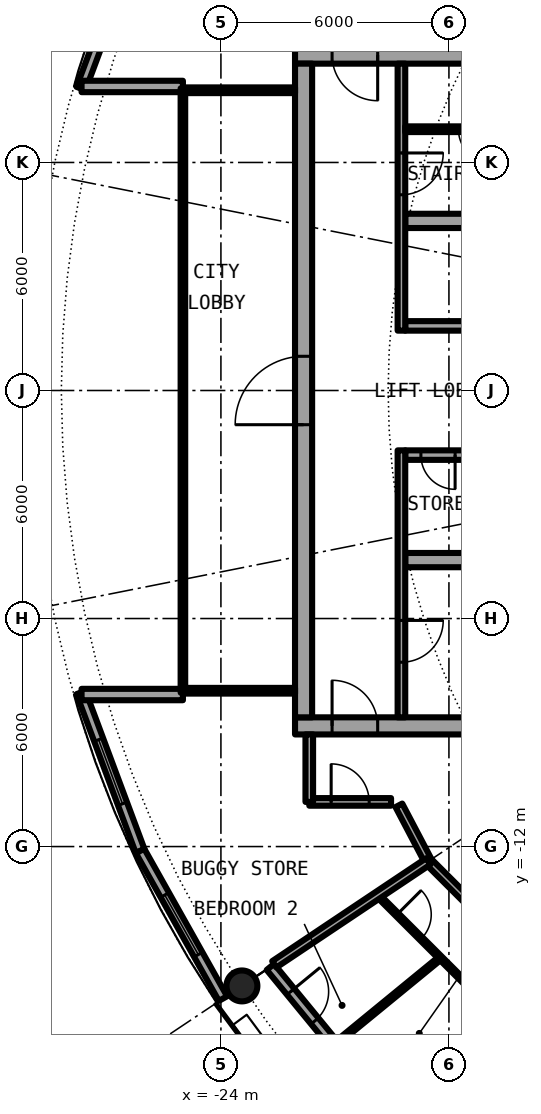
"""IFC4 building model, lengths in metres.
Left out: names, types, materials, properties, quantities, classifications, styles, units other than length and angle.
Written with IfcOpenShell. Run it as: python <this file> out.ifc"""

import sys

from ifc_helpers import new_model, si_unit, direction, frame, frame_2d, origin, origin_2d, place, context, subcontext, project, spatial, rectangle, hollow_circle, extrude, element, fill, save


model = new_model("IFC4")
c1 = context("Model", 3, precision=1e-05, world=origin(), true_north=direction((0.0, 1.0)))
c2 = subcontext(c1, "Body", "Model", "MODEL_VIEW")
j1 = project(units=[si_unit("LENGTHUNIT", "METRE"), si_unit("PLANEANGLEUNIT", "RADIAN")], contexts=[c1])
p1 = place(None, origin())
s1 = spatial("IfcSite", under=j1, at=p1, CompositionType="ELEMENT")
p2 = place(p1, origin())
s2 = spatial("IfcBuilding", under=s1, at=p2, CompositionType="ELEMENT")
p3 = place(p2, frame((0.0, 0.0, 196.3)))
s3 = spatial("IfcBuildingStorey", under=s2, at=p3, CompositionType="ELEMENT", Elevation=196.3)
p4 = place(p3, frame((-23.448, -15.667, 0.0), z_axis=(0.0, 0.0, 1.0), x_axis=(1.0, 0.0, 0.0)))
e1 = element("IfcColumn", 1, at=p4, inside=s3, PredefinedType="COLUMN", context=c2, shape_type="SweptSolid", body=[
    extrude(hollow_circle(Radius=0.406, WallThickness=0.03, at=origin_2d()), origin(), (0.0, 0.0, 1.0), 3.05),
])
p5 = place(p3, frame((-22.699, -15.167, 0.0), z_axis=(0.0, 0.0, 1.0), x_axis=(0.634382322723, -0.773019449054, 0.0)))
e2 = element("IfcWall", 2, at=p5, inside=s3, PredefinedType="SOLIDWALL", context=c2, shape_type="SweptSolid", body=[
    extrude(rectangle(XDim=5.352, YDim=0.25, at=frame_2d((2.676, 0.0))), origin(), (0.0, 0.0, 1.0), 2.7),
])
p6 = place(p5, frame((0.841, 0.0, 0.0)))
e3 = element("IfcOpeningElement", 3, at=p6, cuts=e2, PredefinedType="OPENING", context=c2, shape_type="SweptSolid", body=[
    extrude(rectangle(XDim=1.0, YDim=2.2, at=frame_2d((0.5, 1.1))), frame((0.0, 0.135, 0.0), z_axis=(0.0, -1.0, 0.0), x_axis=(1.0, 0.0, 0.0)), (0.0, 0.0, 1.0), 0.27),
])
p7 = place(p5, frame((3.111, 0.0, 0.3)))
e4 = element("IfcOpeningElement", 4, at=p7, cuts=e2, PredefinedType="OPENING", context=c2, shape_type="SweptSolid", body=[
    extrude(rectangle(XDim=1.8, YDim=2.1, at=frame_2d((0.9, 1.05))), frame((0.0, 0.135, 0.0), z_axis=(0.0, -1.0, 0.0), x_axis=(1.0, 0.0, 0.0)), (0.0, 0.0, 1.0), 0.27),
])
p8 = place(p3, frame((-27.682, -7.945, 0.0), z_axis=(0.0, 0.0, 1.0), x_axis=(0.349247811493, -0.937030397675, 0.0)))
e5 = element("IfcWall", 5, at=p8, inside=s3, PredefinedType="SOLIDWALL", context=c2, shape_type="SweptSolid", body=[
    extrude(rectangle(XDim=4.452, YDim=0.25, at=frame_2d((2.226, 0.0))), origin(), (0.0, 0.0, 1.0), 2.7),
])
p9 = place(p8, frame((1.327, 0.0, 0.3)))
e6 = element("IfcOpeningElement", 6, at=p9, cuts=e5, PredefinedType="OPENING", context=c2, shape_type="SweptSolid", body=[
    extrude(rectangle(XDim=1.8, YDim=2.1, at=frame_2d((0.9, 1.05))), frame((0.0, 0.135, 0.0), z_axis=(0.0, -1.0, 0.0), x_axis=(1.0, 0.0, 0.0)), (0.0, 0.0, 1.0), 0.27),
])
p10 = place(p3, frame((-26.127, -12.117, 0.0), z_axis=(0.0, 0.0, 1.0), x_axis=(0.489696356642, -0.871893042919, 0.0)))
e7 = element("IfcWall", 7, at=p10, inside=s3, PredefinedType="SOLIDWALL", context=c2, shape_type="SweptSolid", body=[
    extrude(rectangle(XDim=4.454, YDim=0.25, at=frame_2d((2.227, 0.0))), origin(), (0.0, 0.0, 1.0), 2.7),
])
p11 = place(p10, frame((1.327, 0.0, 0.3)))
e8 = element("IfcOpeningElement", 8, at=p11, cuts=e7, PredefinedType="OPENING", context=c2, shape_type="SweptSolid", body=[
    extrude(rectangle(XDim=1.8, YDim=2.1, at=frame_2d((0.9, 1.05))), frame((0.0, 0.135, 0.0), z_axis=(0.0, -1.0, 0.0), x_axis=(1.0, 0.0, 0.0)), (0.0, 0.0, 1.0), 0.27),
])
p12 = place(p3, frame((-26.127, 12.117, 0.0), z_axis=(0.0, 0.0, 1.0), x_axis=(-0.349247811493, -0.937030397675, 0.0)))
e9 = element("IfcWall", 9, at=p12, inside=s3, PredefinedType="SOLIDWALL", context=c2, shape_type="SweptSolid", body=[
    extrude(rectangle(XDim=4.452, YDim=0.25, at=frame_2d((2.226, 0.0))), origin(), (0.0, 0.0, 1.0), 2.7),
])
p13 = place(p12, frame((1.327, 0.0, 0.3)))
e10 = element("IfcOpeningElement", 10, at=p13, cuts=e9, PredefinedType="OPENING", context=c2, shape_type="SweptSolid", body=[
    extrude(rectangle(XDim=1.8, YDim=2.1, at=frame_2d((0.9, 1.05))), frame((0.0, 0.135, 0.0), z_axis=(0.0, -1.0, 0.0), x_axis=(1.0, 0.0, 0.0)), (0.0, 0.0, 1.0), 0.27),
])
for number, where, z_axis, x_axis in (
    (11, (-25.0, 8.0, 0.0), (0.0, 0.0, 1.0), (-1.0, 0.0, 0.0)),
    (12, (-25.0, -8.0, 0.0), (0.0, 0.0, 1.0), (-1.0, 0.0, 0.0)),
):
    element("IfcWall", number, at=place(p3, frame(where, z_axis=z_axis, x_axis=x_axis)), inside=s3, PredefinedType="SOLIDWALL", context=c2, shape_type="SweptSolid", body=[
        extrude(rectangle(XDim=2.667, YDim=0.3, at=frame_2d((1.333, 0.0))), origin(), (0.0, 0.0, 1.0), 2.7),
    ])
p14 = place(p3, frame((-22.05, -8.825, 0.0), z_axis=(0.0, 0.0, 1.0), x_axis=(1.0, 0.0, 0.0)))
e13 = element("IfcWall", 13, at=p14, inside=s3, PredefinedType="SHEAR", context=c2, shape_type="SweptSolid", body=[
    extrude(rectangle(XDim=13.5, YDim=0.45, at=frame_2d((6.75, 0.0))), origin(), (0.0, 0.0, 1.0), 3.05),
])
p15 = place(p14, frame((0.975, 0.0, 0.0)))
e14 = element("IfcOpeningElement", 14, at=p15, cuts=e13, PredefinedType="OPENING", context=c2, shape_type="SweptSolid", body=[
    extrude(rectangle(XDim=1.2, YDim=2.3, at=frame_2d((0.6, 1.15))), frame((0.0, 0.235, 0.0), z_axis=(0.0, -1.0, 0.0), x_axis=(1.0, 0.0, 0.0)), (0.0, 0.0, 1.0), 0.47),
])
p16 = place(p3, frame((-8.55, 8.825, 0.0), z_axis=(0.0, 0.0, 1.0), x_axis=(-1.0, 0.0, 0.0)))
e15 = element("IfcWall", 15, at=p16, inside=s3, PredefinedType="SHEAR", context=c2, shape_type="SweptSolid", body=[
    extrude(rectangle(XDim=13.5, YDim=0.45, at=frame_2d((6.75, 0.0))), origin(), (0.0, 0.0, 1.0), 3.05),
])
p17 = place(p16, frame((11.325, 0.0, 0.0)))
e16 = element("IfcOpeningElement", 16, at=p17, cuts=e15, PredefinedType="OPENING", context=c2, shape_type="SweptSolid", body=[
    extrude(rectangle(XDim=1.2, YDim=2.3, at=frame_2d((0.6, 1.15))), frame((0.0, 0.235, 0.0), z_axis=(0.0, -1.0, 0.0), x_axis=(1.0, 0.0, 0.0)), (0.0, 0.0, 1.0), 0.47),
])
p18 = place(p3, frame((-21.825, -8.6, 0.0), z_axis=(0.0, 0.0, 1.0), x_axis=(0.0, 1.0, 0.0)))
e17 = element("IfcWall", 17, at=p18, inside=s3, PredefinedType="SHEAR", context=c2, shape_type="SweptSolid", body=[
    extrude(rectangle(XDim=17.2, YDim=0.45, at=frame_2d((8.6, 0.0))), origin(), (0.0, 0.0, 1.0), 3.05),
])
p19 = place(p18, frame((7.7, 0.0, 0.0)))
e18 = element("IfcOpeningElement", 18, at=p19, cuts=e17, PredefinedType="OPENING", context=c2, shape_type="SweptSolid", body=[
    extrude(rectangle(XDim=1.8, YDim=2.3, at=frame_2d((0.9, 1.15))), frame((0.0, 0.235, 0.0), z_axis=(0.0, -1.0, 0.0), x_axis=(1.0, 0.0, 0.0)), (0.0, 0.0, 1.0), 0.47),
])
p20 = place(p3, frame((-9.0, -1.7, 0.0), z_axis=(0.0, 0.0, 1.0), x_axis=(-1.0, 0.0, 0.0)))
e19 = element("IfcWall", 19, at=p20, inside=s3, PredefinedType="SHEAR", context=c2, shape_type="SweptSolid", body=[
    extrude(rectangle(XDim=10.15, YDim=0.25, at=frame_2d((5.075, 0.0))), origin(), (0.0, 0.0, 1.0), 3.05),
])
p21 = place(p20, frame((2.488, 0.0, 0.0)))
e20 = element("IfcOpeningElement", 20, at=p21, cuts=e19, PredefinedType="OPENING", context=c2, shape_type="SweptSolid", body=[
    extrude(rectangle(XDim=0.9, YDim=2.3, at=frame_2d((0.45, 1.15))), frame((0.0, 0.135, 0.0), z_axis=(0.0, -1.0, 0.0), x_axis=(1.0, 0.0, 0.0)), (0.0, 0.0, 1.0), 0.27),
])
p22 = place(p20, frame((8.837, 0.0, 0.0)))
e21 = element("IfcOpeningElement", 21, at=p22, cuts=e19, PredefinedType="OPENING", context=c2, shape_type="SweptSolid", body=[
    extrude(rectangle(XDim=0.9, YDim=2.3, at=frame_2d((0.45, 1.15))), frame((0.0, 0.135, 0.0), z_axis=(0.0, -1.0, 0.0), x_axis=(1.0, 0.0, 0.0)), (0.0, 0.0, 1.0), 0.27),
])
p23 = place(p3, frame((-9.0, -4.462, 0.0), z_axis=(0.0, 0.0, 1.0), x_axis=(-1.0, 0.0, 0.0)))
e22 = element("IfcWall", 22, at=p23, inside=s3, PredefinedType="SHEAR", context=c2, shape_type="SweptSolid", body=[
    extrude(rectangle(XDim=10.15, YDim=0.375, at=frame_2d((5.075, 0.0))), origin(), (0.0, 0.0, 1.0), 3.05),
])
p24 = place(p23, frame((6.6, 0.0, 0.0)))
e23 = element("IfcOpeningElement", 23, at=p24, cuts=e22, PredefinedType="OPENING", context=c2, shape_type="SweptSolid", body=[
    extrude(rectangle(XDim=1.1, YDim=2.3, at=frame_2d((0.55, 1.15))), frame((0.0, 0.198, 0.0), z_axis=(0.0, -1.0, 0.0), x_axis=(1.0, 0.0, 0.0)), (0.0, 0.0, 1.0), 0.395),
])
p25 = place(p3, frame((-19.25, -1.575, 0.0), z_axis=(0.0, 0.0, 1.0), x_axis=(0.0, -1.0, 0.0)))
e24 = element("IfcWall", 24, at=p25, inside=s3, PredefinedType="SOLIDWALL", context=c2, shape_type="SweptSolid", body=[
    extrude(rectangle(XDim=7.025, YDim=0.2, at=frame_2d((3.513, 0.0))), origin(), (0.0, 0.0, 1.0), 2.7),
])
p26 = place(p25, frame((4.475, 0.0, 0.0)))
e25 = element("IfcOpeningElement", 25, at=p26, cuts=e24, PredefinedType="OPENING", context=c2, shape_type="SweptSolid", body=[
    extrude(rectangle(XDim=1.1, YDim=2.3, at=frame_2d((0.55, 1.15))), frame((0.0, 0.11, 0.0), z_axis=(0.0, -1.0, 0.0), x_axis=(1.0, 0.0, 0.0)), (0.0, 0.0, 1.0), 0.22),
])
p27 = place(p3, frame((-9.0, 1.7, 0.0), z_axis=(0.0, 0.0, 1.0), x_axis=(-1.0, 0.0, 0.0)))
e26 = element("IfcWall", 26, at=p27, inside=s3, PredefinedType="SHEAR", context=c2, shape_type="SweptSolid", body=[
    extrude(rectangle(XDim=10.15, YDim=0.25, at=frame_2d((5.075, 0.0))), origin(), (0.0, 0.0, 1.0), 3.05),
])
p28 = place(p27, frame((0.387, 0.0, 0.0)))
e27 = element("IfcOpeningElement", 27, at=p28, cuts=e26, PredefinedType="OPENING", context=c2, shape_type="SweptSolid", body=[
    extrude(rectangle(XDim=1.1, YDim=2.3, at=frame_2d((0.55, 1.15))), frame((0.0, 0.135, 0.0), z_axis=(0.0, -1.0, 0.0), x_axis=(1.0, 0.0, 0.0)), (0.0, 0.0, 1.0), 0.27),
])
p29 = place(p27, frame((2.45, 0.0, 0.0)))
e28 = element("IfcOpeningElement", 28, at=p29, cuts=e26, PredefinedType="OPENING", context=c2, shape_type="SweptSolid", body=[
    extrude(rectangle(XDim=1.1, YDim=2.3, at=frame_2d((0.55, 1.15))), frame((0.0, 0.135, 0.0), z_axis=(0.0, -1.0, 0.0), x_axis=(1.0, 0.0, 0.0)), (0.0, 0.0, 1.0), 0.27),
])
p30 = place(p27, frame((4.45, 0.0, 0.0)))
e29 = element("IfcOpeningElement", 29, at=p30, cuts=e26, PredefinedType="OPENING", context=c2, shape_type="SweptSolid", body=[
    extrude(rectangle(XDim=1.1, YDim=2.3, at=frame_2d((0.55, 1.15))), frame((0.0, 0.135, 0.0), z_axis=(0.0, -1.0, 0.0), x_axis=(1.0, 0.0, 0.0)), (0.0, 0.0, 1.0), 0.27),
])
p31 = place(p27, frame((6.6, 0.0, 0.0)))
e30 = element("IfcOpeningElement", 30, at=p31, cuts=e26, PredefinedType="OPENING", context=c2, shape_type="SweptSolid", body=[
    extrude(rectangle(XDim=1.1, YDim=2.3, at=frame_2d((0.55, 1.15))), frame((0.0, 0.135, 0.0), z_axis=(0.0, -1.0, 0.0), x_axis=(1.0, 0.0, 0.0)), (0.0, 0.0, 1.0), 0.27),
])
p32 = place(p3, frame((-9.0, 4.462, 0.0), z_axis=(0.0, 0.0, 1.0), x_axis=(-1.0, 0.0, 0.0)))
e31 = element("IfcWall", 31, at=p32, inside=s3, PredefinedType="SHEAR", context=c2, shape_type="SweptSolid", body=[
    extrude(rectangle(XDim=10.15, YDim=0.375, at=frame_2d((5.075, 0.0))), origin(), (0.0, 0.0, 1.0), 3.05),
])
p33 = place(p3, frame((-19.25, 8.6, 0.0), z_axis=(0.0, 0.0, 1.0), x_axis=(0.0, -1.0, 0.0)))
e32 = element("IfcWall", 32, at=p33, inside=s3, PredefinedType="SOLIDWALL", context=c2, shape_type="SweptSolid", body=[
    extrude(rectangle(XDim=7.025, YDim=0.2, at=frame_2d((3.513, 0.0))), origin(), (0.0, 0.0, 1.0), 2.7),
])
p34 = place(p33, frame((2.35, 0.0, 0.0)))
e33 = element("IfcOpeningElement", 33, at=p34, cuts=e32, PredefinedType="OPENING", context=c2, shape_type="SweptSolid", body=[
    extrude(rectangle(XDim=1.1, YDim=2.3, at=frame_2d((0.55, 1.15))), frame((0.0, 0.11, 0.0), z_axis=(0.0, -1.0, 0.0), x_axis=(1.0, 0.0, 0.0)), (0.0, 0.0, 1.0), 0.22),
])
p35 = place(p3, frame((-15.45, 6.875, 0.0), z_axis=(0.0, 0.0, 1.0), x_axis=(-1.0, 0.0, 0.0)))
e34 = element("IfcWall", 34, at=p35, inside=s3, PredefinedType="PARTITIONING", context=c2, shape_type="SweptSolid", body=[
    extrude(rectangle(XDim=3.7, YDim=0.15, at=frame_2d((1.85, 0.0))), origin(), (0.0, 0.0, 1.0), 2.7),
])
p36 = place(p35, frame((1.4, 0.0, 0.0)))
e35 = element("IfcOpeningElement", 35, at=p36, cuts=e34, PredefinedType="OPENING", context=c2, shape_type="SweptSolid", body=[
    extrude(rectangle(XDim=0.9, YDim=2.3, at=frame_2d((0.45, 1.15))), frame((0.0, 0.085, 0.0), z_axis=(0.0, -1.0, 0.0), x_axis=(1.0, 0.0, 0.0)), (0.0, 0.0, 1.0), 0.17),
])
for number, where, z_axis, x_axis in (
    (36, (-22.05, 7.9, 0.0), (0.0, 0.0, 1.0), (-1.0, 0.0, 0.0)),
    (37, (-22.05, -7.9, 0.0), (0.0, 0.0, 1.0), (-1.0, 0.0, 0.0)),
):
    element("IfcWall", number, at=place(p3, frame(where, z_axis=z_axis, x_axis=x_axis)), inside=s3, PredefinedType="PARTITIONING", context=c2, shape_type="SweptSolid", body=[
        extrude(rectangle(XDim=2.89, YDim=0.15, at=frame_2d((1.445, 0.0))), origin(), (0.0, 0.0, 1.0), 2.7),
    ])
p37 = place(p3, frame((-25.0, 7.95, 0.0), z_axis=(0.0, 0.0, 1.0), x_axis=(0.0, -1.0, 0.0)))
e38 = element("IfcWall", 38, at=p37, inside=s3, PredefinedType="PARTITIONING", context=c2, shape_type="SweptSolid", body=[
    extrude(rectangle(XDim=15.9, YDim=0.12, at=frame_2d((7.95, 0.0))), origin(), (0.0, 0.0, 1.0), 2.7),
])
p38 = place(p37, frame((0.95, 0.0, 0.1)))
e39 = element("IfcOpeningElement", 39, at=p38, cuts=e38, PredefinedType="OPENING", context=c2, shape_type="SweptSolid", body=[
    extrude(rectangle(XDim=14.0, YDim=2.35, at=frame_2d((7.0, 1.175))), frame((0.0, 0.07, 0.0), z_axis=(0.0, -1.0, 0.0), x_axis=(1.0, 0.0, 0.0)), (0.0, 0.0, 1.0), 0.14),
])
p39 = place(p3, frame((-19.869, -13.285, 0.0), z_axis=(0.0, 0.0, 1.0), x_axis=(0.707290020325, -0.706923494552, 0.0)))
e40 = element("IfcWall", 40, at=p39, inside=s3, PredefinedType="PARTITIONING", context=c2, shape_type="SweptSolid", body=[
    extrude(rectangle(XDim=4.663, YDim=0.1, at=frame_2d((2.331, 0.0))), origin(), (0.0, 0.0, 1.0), 2.7),
])
p40 = place(p39, frame((0.712, 0.0, 0.0)))
e41 = element("IfcOpeningElement", 41, at=p40, cuts=e40, PredefinedType="OPENING", context=c2, shape_type="SweptSolid", body=[
    extrude(rectangle(XDim=0.9, YDim=2.3, at=frame_2d((0.45, 1.15))), frame((0.0, 0.06, 0.0), z_axis=(0.0, -1.0, 0.0), x_axis=(1.0, 0.0, 0.0)), (0.0, 0.0, 1.0), 0.12),
])
p41 = place(p3, frame((-19.317, -10.915, 0.0), z_axis=(0.0, 0.0, 1.0), x_axis=(0.465359652486, -0.885121683068, 0.0)))
e42 = element("IfcWall", 42, at=p41, inside=s3, PredefinedType="PARTITIONING", context=c2, shape_type="SweptSolid", body=[
    extrude(rectangle(XDim=1.665, YDim=0.2, at=frame_2d((0.833, 0.0))), origin(), (0.0, 0.0, 1.0), 2.7),
])
p42 = place(p3, frame((-18.542, -12.389, 0.0), z_axis=(0.0, 0.0, 1.0), x_axis=(0.707106781187, -0.707106781187, 0.0)))
e43 = element("IfcWall", 43, at=p42, inside=s3, PredefinedType="PARTITIONING", context=c2, shape_type="SweptSolid", body=[
    extrude(rectangle(XDim=8.702, YDim=0.2, at=frame_2d((4.351, 0.0))), origin(), (0.0, 0.0, 1.0), 2.7),
])
p43 = place(p42, frame((2.763, 0.0, 0.0)))
e44 = element("IfcOpeningElement", 44, at=p43, cuts=e43, PredefinedType="OPENING", context=c2, shape_type="SweptSolid", body=[
    extrude(rectangle(XDim=1.0, YDim=2.3, at=frame_2d((0.5, 1.15))), frame((0.0, 0.11, 0.0), z_axis=(0.0, -1.0, 0.0), x_axis=(1.0, 0.0, 0.0)), (0.0, 0.0, 1.0), 0.22),
])
p44 = place(p3, frame((-21.675, -10.825, 0.0), z_axis=(0.0, 0.0, 1.0), x_axis=(1.0, 0.0, 0.0)))
e45 = element("IfcWall", 45, at=p44, inside=s3, PredefinedType="PARTITIONING", context=c2, shape_type="SweptSolid", body=[
    extrude(rectangle(XDim=2.152, YDim=0.2, at=frame_2d((1.076, 0.0))), origin(), (0.0, 0.0, 1.0), 2.7),
])
p45 = place(p44, frame((0.576, 0.0, 0.0)))
e46 = element("IfcOpeningElement", 46, at=p45, cuts=e45, PredefinedType="OPENING", context=c2, shape_type="SweptSolid", body=[
    extrude(rectangle(XDim=1.0, YDim=2.3, at=frame_2d((0.5, 1.15))), frame((0.0, 0.11, 0.0), z_axis=(0.0, -1.0, 0.0), x_axis=(1.0, 0.0, 0.0)), (0.0, 0.0, 1.0), 0.22),
])
p46 = place(p3, frame((-22.595, -15.098, 0.0), z_axis=(0.0, 0.0, 1.0), x_axis=(0.831387096605, 0.55569370664, 0.0)))
e47 = element("IfcWall", 47, at=p46, inside=s3, PredefinedType="PARTITIONING", context=c2, shape_type="SweptSolid", body=[
    extrude(rectangle(XDim=4.875, YDim=0.2, at=frame_2d((2.438, 0.0))), origin(), (0.0, 0.0, 1.0), 2.7),
])
p47 = place(p3, frame((-21.023, -17.22, 0.0), z_axis=(0.0, 0.0, 1.0), x_axis=(0.773548271597, 0.633737383709, 0.0)))
e48 = element("IfcWall", 48, at=p47, inside=s3, PredefinedType="PARTITIONING", context=c2, shape_type="SweptSolid", body=[
    extrude(rectangle(XDim=3.618, YDim=0.1, at=frame_2d((1.809, 0.0))), origin(), (0.0, 0.0, 1.0), 2.7),
])
p48 = place(p3, frame((-19.216, -19.216, 0.0), z_axis=(0.0, 0.0, 1.0), x_axis=(0.707106781187, 0.707106781187, 0.0)))
e49 = element("IfcWall", 49, at=p48, inside=s3, PredefinedType="PARTITIONING", context=c2, shape_type="SweptSolid", body=[
    extrude(rectangle(XDim=3.735, YDim=0.1, at=frame_2d((1.868, 0.0))), origin(), (0.0, 0.0, 1.0), 2.7),
])
p49 = place(p48, frame((1.417, 0.0, 0.0)))
e50 = element("IfcOpeningElement", 50, at=p49, cuts=e49, PredefinedType="OPENING", context=c2, shape_type="SweptSolid", body=[
    extrude(rectangle(XDim=0.9, YDim=2.3, at=frame_2d((0.45, 1.15))), frame((0.0, 0.06, 0.0), z_axis=(0.0, -1.0, 0.0), x_axis=(1.0, 0.0, 0.0)), (0.0, 0.0, 1.0), 0.12),
])
p50 = place(p3, frame((-21.675, -10.825, 0.0), z_axis=(0.0, 0.0, 1.0), x_axis=(0.0, 1.0, 0.0)))
e51 = element("IfcWall", 51, at=p50, inside=s3, PredefinedType="PARTITIONING", context=c2, shape_type="SweptSolid", body=[
    extrude(rectangle(XDim=1.775, YDim=0.2, at=frame_2d((0.887, 0.0))), origin(), (0.0, 0.0, 1.0), 2.7),
])
p51 = place(p6, origin())
e52 = element("IfcDoor", 52, at=p51, inside=s3, OperationType="SINGLE_SWING_LEFT", PredefinedType="DOOR", context=c2, shape_type="SweptSolid", body=[
    extrude(rectangle(XDim=1.0, YDim=2.2, at=frame_2d((0.5, 1.1))), frame((0.0, 0.025, 0.0), z_axis=(0.0, -1.0, 0.0), x_axis=(1.0, 0.0, 0.0)), (0.0, 0.0, 1.0), 0.05),
])
fill(e3, e52)
p52 = place(p9, origin())
e53 = element("IfcWindow", 53, at=p52, inside=s3, PartitioningType="SINGLE_PANEL", PredefinedType="WINDOW", context=c2, shape_type="SweptSolid", body=[
    extrude(rectangle(XDim=1.8, YDim=2.1, at=frame_2d((0.9, 1.05))), frame((0.0, 0.03, 0.0), z_axis=(0.0, -1.0, 0.0), x_axis=(1.0, 0.0, 0.0)), (0.0, 0.0, 1.0), 0.06),
])
fill(e6, e53)
p53 = place(p11, origin())
e54 = element("IfcWindow", 54, at=p53, inside=s3, PartitioningType="SINGLE_PANEL", PredefinedType="WINDOW", context=c2, shape_type="SweptSolid", body=[
    extrude(rectangle(XDim=1.8, YDim=2.1, at=frame_2d((0.9, 1.05))), frame((0.0, 0.03, 0.0), z_axis=(0.0, -1.0, 0.0), x_axis=(1.0, 0.0, 0.0)), (0.0, 0.0, 1.0), 0.06),
])
fill(e8, e54)
p54 = place(p22, origin())
e55 = element("IfcDoor", 55, at=p54, inside=s3, OperationType="SINGLE_SWING_LEFT", PredefinedType="DOOR", context=c2, shape_type="SweptSolid", body=[
    extrude(rectangle(XDim=0.9, YDim=2.3, at=frame_2d((0.45, 1.15))), frame((0.0, 0.025, 0.0), z_axis=(0.0, -1.0, 0.0), x_axis=(1.0, 0.0, 0.0)), (0.0, 0.0, 1.0), 0.05),
])
fill(e21, e55)
p55 = place(p36, origin())
e56 = element("IfcDoor", 56, at=p55, inside=s3, OperationType="SINGLE_SWING_LEFT", PredefinedType="DOOR", context=c2, shape_type="SweptSolid", body=[
    extrude(rectangle(XDim=0.9, YDim=2.3, at=frame_2d((0.45, 1.15))), frame((0.0, 0.025, 0.0), z_axis=(0.0, -1.0, 0.0), x_axis=(1.0, 0.0, 0.0)), (0.0, 0.0, 1.0), 0.05),
])
fill(e35, e56)
p56 = place(p26, origin())
e57 = element("IfcDoor", 57, at=p56, inside=s3, OperationType="SINGLE_SWING_LEFT", PredefinedType="DOOR", context=c2, shape_type="SweptSolid", body=[
    extrude(rectangle(XDim=1.1, YDim=2.3, at=frame_2d((0.55, 1.15))), frame((0.0, 0.025, 0.0), z_axis=(0.0, -1.0, 0.0), x_axis=(1.0, 0.0, 0.0)), (0.0, 0.0, 1.0), 0.05),
])
fill(e25, e57)
p57 = place(p34, origin())
e58 = element("IfcDoor", 58, at=p57, inside=s3, OperationType="SINGLE_SWING_RIGHT", PredefinedType="DOOR", context=c2, shape_type="SweptSolid", body=[
    extrude(rectangle(XDim=1.1, YDim=2.3, at=frame_2d((0.55, 1.15))), frame((0.0, 0.025, 0.0), z_axis=(0.0, -1.0, 0.0), x_axis=(1.0, 0.0, 0.0)), (0.0, 0.0, 1.0), 0.05),
])
fill(e33, e58)
p58 = place(p15, origin())
e59 = element("IfcDoor", 59, at=p58, inside=s3, OperationType="SINGLE_SWING_RIGHT", PredefinedType="DOOR", context=c2, shape_type="SweptSolid", body=[
    extrude(rectangle(XDim=1.2, YDim=2.3, at=frame_2d((0.6, 1.15))), frame((0.0, 0.025, 0.0), z_axis=(0.0, -1.0, 0.0), x_axis=(1.0, 0.0, 0.0)), (0.0, 0.0, 1.0), 0.05),
])
fill(e14, e59)
p59 = place(p17, origin())
e60 = element("IfcDoor", 60, at=p59, inside=s3, OperationType="SINGLE_SWING_LEFT", PredefinedType="DOOR", context=c2, shape_type="SweptSolid", body=[
    extrude(rectangle(XDim=1.2, YDim=2.3, at=frame_2d((0.6, 1.15))), frame((0.0, 0.025, 0.0), z_axis=(0.0, -1.0, 0.0), x_axis=(1.0, 0.0, 0.0)), (0.0, 0.0, 1.0), 0.05),
])
fill(e16, e60)
p60 = place(p19, origin())
e61 = element("IfcDoor", 61, at=p60, inside=s3, OperationType="SINGLE_SWING_LEFT", PredefinedType="DOOR", context=c2, shape_type="SweptSolid", body=[
    extrude(rectangle(XDim=1.8, YDim=2.3, at=frame_2d((0.9, 1.15))), frame((0.0, 0.025, 0.0), z_axis=(0.0, -1.0, 0.0), x_axis=(1.0, 0.0, 0.0)), (0.0, 0.0, 1.0), 0.05),
])
fill(e18, e61)
p61 = place(p38, origin())
e62 = element("IfcWindow", 62, at=p61, inside=s3, PartitioningType="SINGLE_PANEL", PredefinedType="WINDOW", context=c2, shape_type="SweptSolid", body=[
    extrude(rectangle(XDim=14.0, YDim=2.35, at=frame_2d((7.0, 1.175))), frame((0.0, 0.03, 0.0), z_axis=(0.0, -1.0, 0.0), x_axis=(1.0, 0.0, 0.0)), (0.0, 0.0, 1.0), 0.06),
])
fill(e39, e62)
p62 = place(p40, origin())
e63 = element("IfcDoor", 63, at=p62, inside=s3, OperationType="SINGLE_SWING_LEFT", PredefinedType="DOOR", context=c2, shape_type="SweptSolid", body=[
    extrude(rectangle(XDim=0.9, YDim=2.3, at=frame_2d((0.45, 1.15))), frame((0.0, 0.025, 0.0), z_axis=(0.0, -1.0, 0.0), x_axis=(1.0, 0.0, 0.0)), (0.0, 0.0, 1.0), 0.05),
])
fill(e41, e63)
p63 = place(p45, origin())
e64 = element("IfcDoor", 64, at=p63, inside=s3, OperationType="SINGLE_SWING_LEFT", PredefinedType="DOOR", context=c2, shape_type="SweptSolid", body=[
    extrude(rectangle(XDim=1.0, YDim=2.3, at=frame_2d((0.5, 1.15))), frame((0.0, 0.025, 0.0), z_axis=(0.0, -1.0, 0.0), x_axis=(1.0, 0.0, 0.0)), (0.0, 0.0, 1.0), 0.05),
])
fill(e46, e64)
save(model, sys.argv[1])
